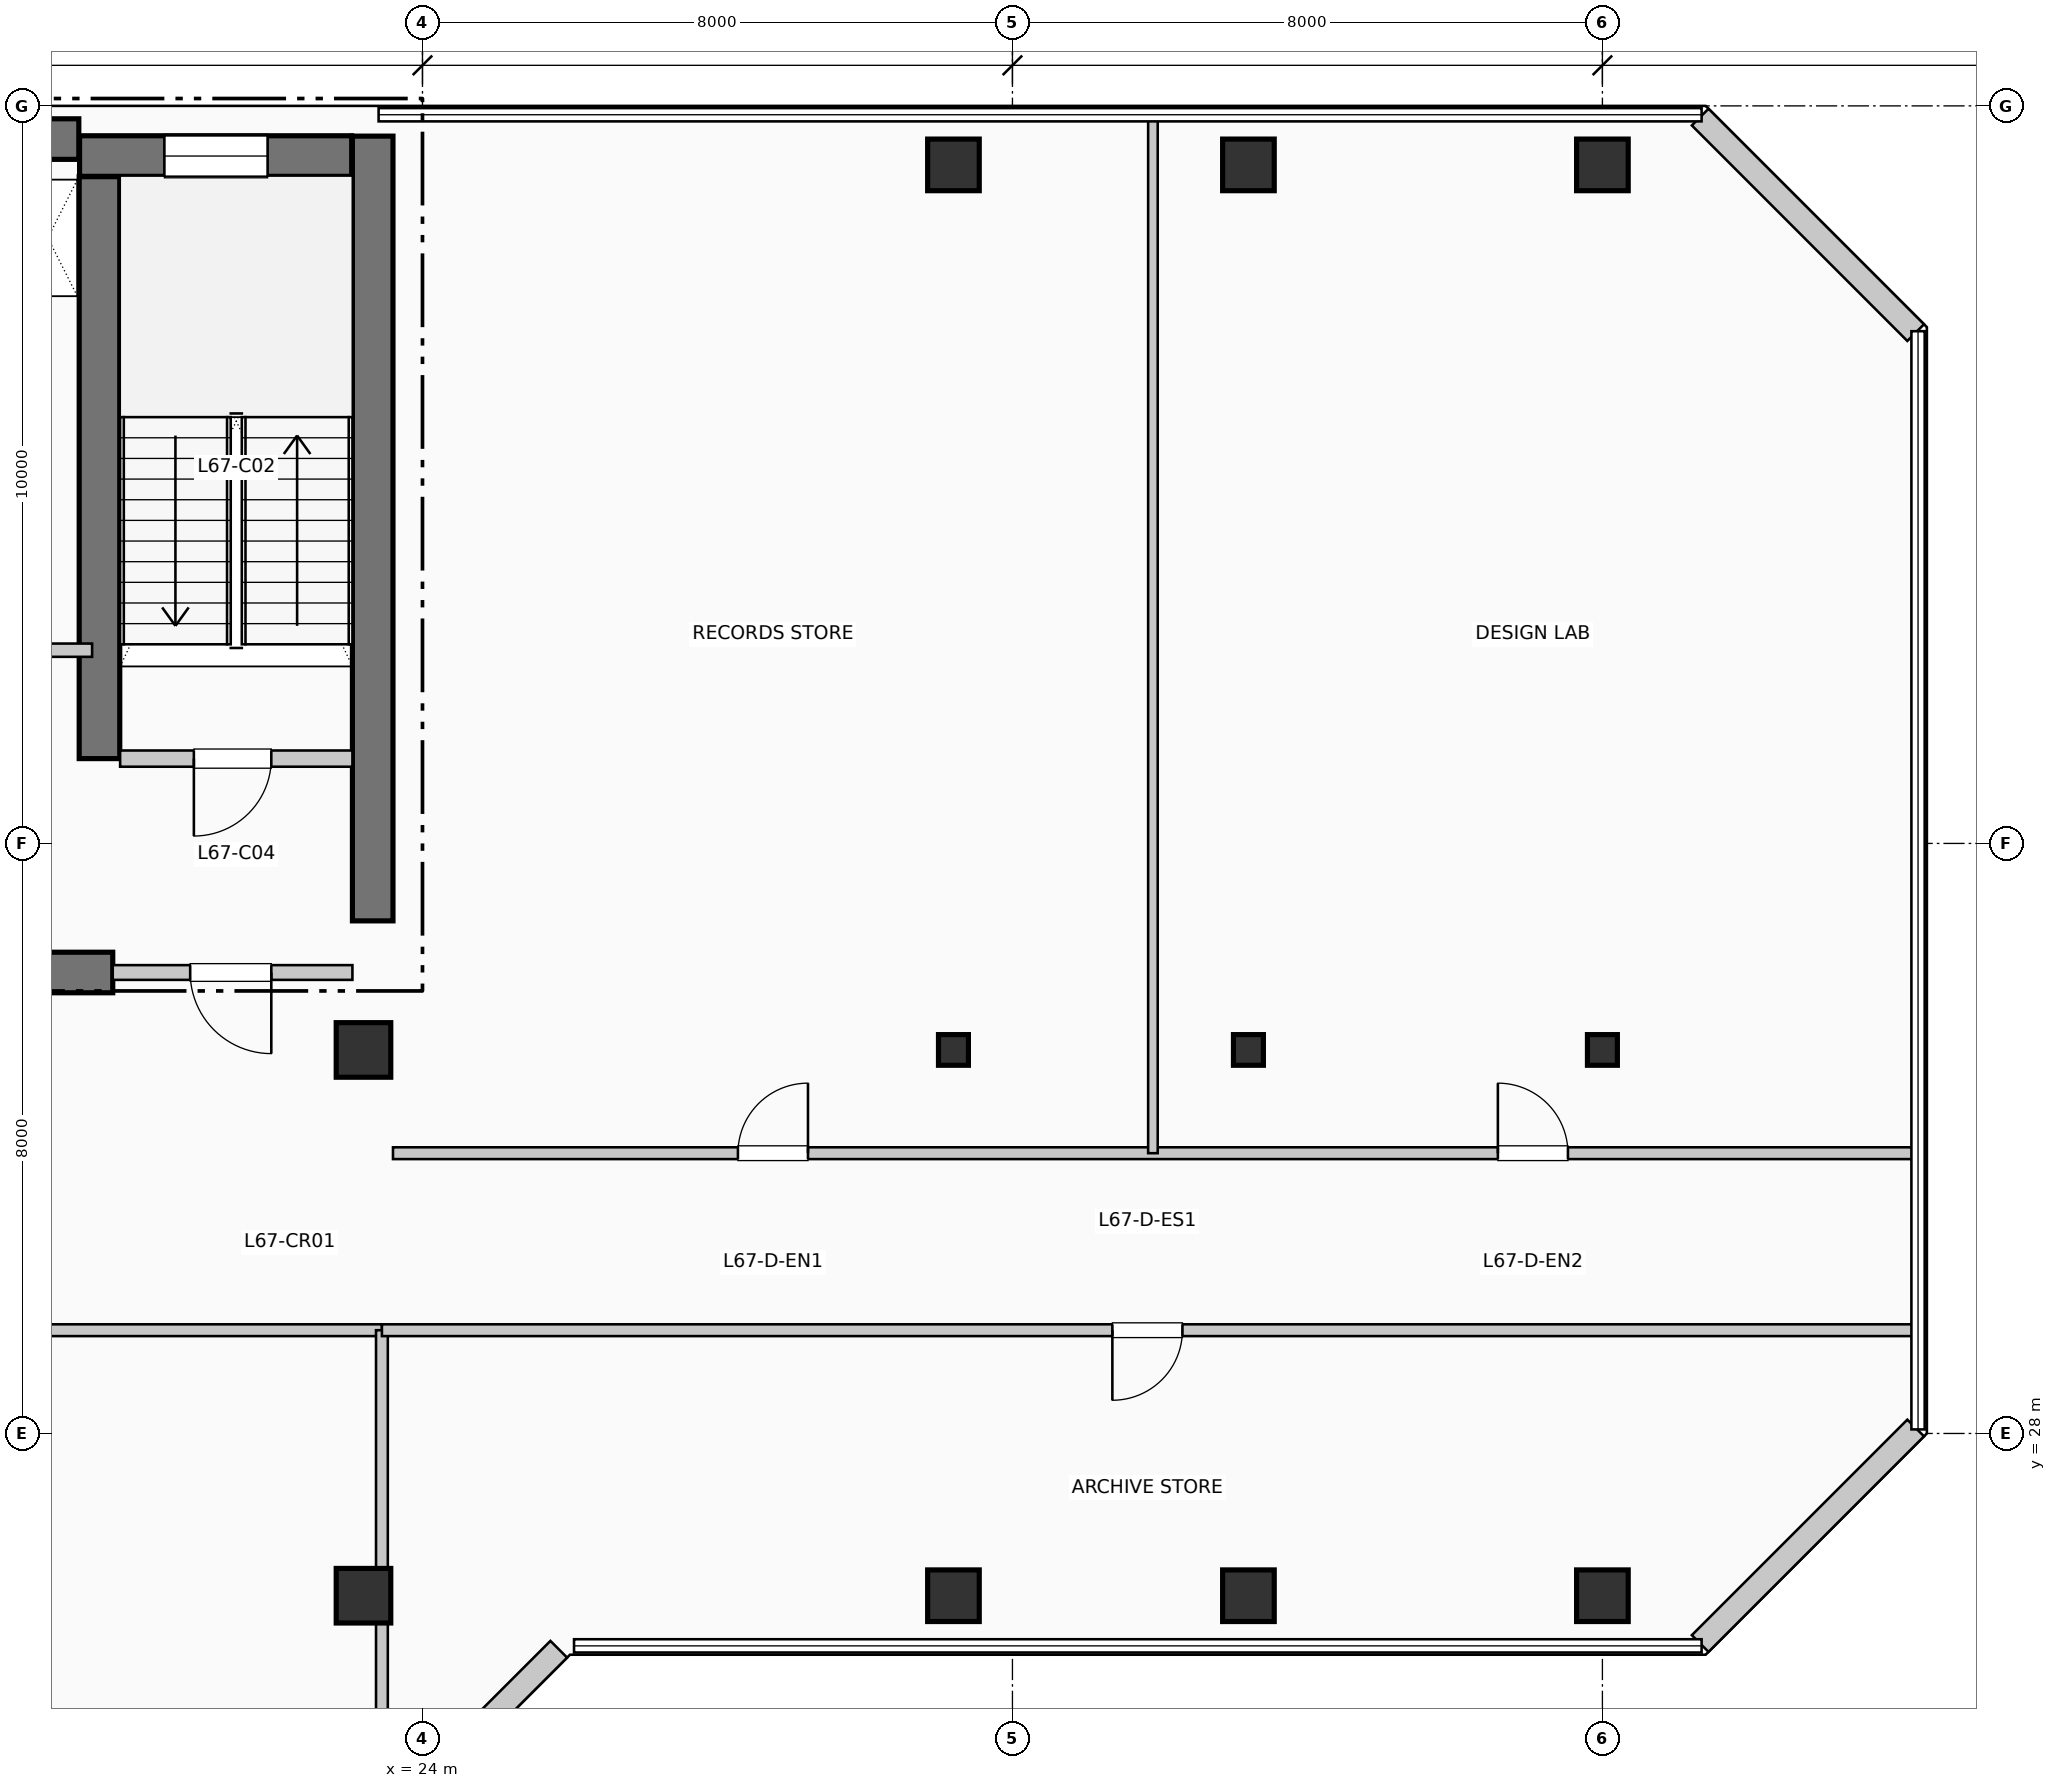
"""IFC4 building model, lengths in metres.
Left out: names, types, materials, properties, quantities, classifications, styles, units other than length and angle.
Written with IfcOpenShell. Run it as: python <this file> out.ifc"""

import sys

from ifc_helpers import new_model, si_unit, direction, frame, frame_2d, origin, origin_2d, place, context, subcontext, project, spatial, rectangle, i_section, extrude, element, fill, save


model = new_model("IFC4")
c1 = context("Model", 3, precision=1e-05, world=origin(), true_north=direction((0.0, 1.0)))
c2 = subcontext(c1, "Body", "Model", "MODEL_VIEW")
j1 = project(units=[si_unit("LENGTHUNIT", "METRE"), si_unit("PLANEANGLEUNIT", "RADIAN")], contexts=[c1])
p1 = place(None, origin())
s1 = spatial("IfcSite", under=j1, at=p1, CompositionType="ELEMENT")
p2 = place(p1, origin())
s2 = spatial("IfcBuilding", under=s1, at=p2, CompositionType="ELEMENT")
p3 = place(p2, frame((0.0, 0.0, 276.21)))
s3 = spatial("IfcBuildingStorey", under=s2, at=p3, CompositionType="ELEMENT", Elevation=276.21)
p4 = place(p3, frame((5.36, 45.55, 0.0), z_axis=(0.0, 0.0, 1.0), x_axis=(1.0, 0.0, 0.0)))
e1 = element("IfcWall", 1, at=p4, inside=s3, PredefinedType="SHEAR", context=c2, shape_type="SweptSolid", body=[
    extrude(rectangle(XDim=13.98, YDim=0.55, at=frame_2d((6.99, 0.0))), origin(), (0.0, 0.0, 1.0), 3.96),
])
p5 = place(p3, frame((23.325, 34.95, 0.0), z_axis=(0.0, 0.0, 1.0), x_axis=(0.0, 1.0, 0.0)))
e2 = element("IfcWall", 2, at=p5, inside=s3, PredefinedType="SHEAR", context=c2, shape_type="SweptSolid", body=[
    extrude(rectangle(XDim=10.64, YDim=0.55, at=frame_2d((5.32, 0.0))), origin(), (0.0, 0.0, 1.0), 3.96),
])
p6 = place(p3, frame((13.68, 34.25, 0.0), z_axis=(0.0, 0.0, 1.0), x_axis=(1.0, 0.0, 0.0)))
e3 = element("IfcWall", 3, at=p6, inside=s3, PredefinedType="SHEAR", context=c2, shape_type="SweptSolid", body=[
    extrude(rectangle(XDim=6.12, YDim=0.55, at=frame_2d((3.06, 0.0))), origin(), (0.0, 0.0, 1.0), 3.96),
])
p7 = place(p3, frame((19.62, 37.15, 0.0), z_axis=(0.0, 0.0, 1.0), x_axis=(0.0, 1.0, 0.0)))
e4 = element("IfcWall", 4, at=p7, inside=s3, PredefinedType="SHEAR", context=c2, shape_type="SweptSolid", body=[
    extrude(rectangle(XDim=7.89, YDim=0.55, at=frame_2d((3.945, 0.0))), origin(), (0.0, 0.0, 1.0), 3.96),
])
p8 = place(p3, frame((19.35, 45.32, 0.0), z_axis=(0.0, 0.0, 1.0), x_axis=(1.0, 0.0, 0.0)))
e5 = element("IfcWall", 5, at=p8, inside=s3, PredefinedType="SHEAR", context=c2, shape_type="SweptSolid", body=[
    extrude(rectangle(XDim=3.69, YDim=0.55, at=frame_2d((1.845, 0.0))), origin(), (0.0, 0.0, 1.0), 3.96),
])
p9 = place(p8, frame((1.15, 0.0, 1.05)))
e6 = element("IfcOpeningElement", 6, at=p9, cuts=e5, PredefinedType="OPENING", context=c2, shape_type="SweptSolid", body=[
    extrude(rectangle(XDim=1.4, YDim=1.8, at=frame_2d((0.7, 0.9))), frame((0.0, 0.285, 0.0), z_axis=(0.0, -1.0, 0.0), x_axis=(1.0, 0.0, 0.0)), (0.0, 0.0, 1.0), 0.57),
])
for number, where, z_axis, x_axis in (
    (7, (23.2, 25.8, 0.0), (0.0, 0.0, 1.0), (1.0, 0.0, 0.0)),
    (8, (23.2, 33.2, 0.0), (0.0, 0.0, 1.0), (1.0, 0.0, 0.0)),
):
    element("IfcColumn", number, at=place(p3, frame(where, z_axis=z_axis, x_axis=x_axis)), inside=s3, PredefinedType="COLUMN", context=c2, shape_type="SweptSolid", body=[
        extrude(rectangle(XDim=0.74, YDim=0.74, at=origin_2d()), origin(), (0.0, 0.0, 1.0), 3.96),
    ])
p10 = place(p3, frame((31.2, 25.8, 0.0), z_axis=(0.0, 0.0, 1.0), x_axis=(1.0, 0.0, 0.0)))
e9 = element("IfcColumn", 9, at=p10, inside=s3, PredefinedType="COLUMN", context=c2, shape_type="SweptSolid", body=[
    extrude(rectangle(XDim=0.7, YDim=0.7, at=origin_2d()), origin(), (0.0, 0.0, 1.0), 3.96),
])
p11 = place(p3, frame((31.2, 33.2, 0.0), z_axis=(0.0, 0.0, 1.0), x_axis=(1.0, 0.0, 0.0)))
e10 = element("IfcColumn", 10, at=p11, inside=s3, PredefinedType="COLUMN", context=c2, shape_type="SweptSolid", body=[
    extrude(i_section(OverallWidth=0.406, OverallDepth=0.416, WebThickness=0.022, FlangeThickness=0.036, at=origin_2d()), origin(), (0.0, 0.0, 1.0), 3.96),
])
for number, where, z_axis, x_axis in (
    (11, (31.2, 45.2, 0.0), (0.0, 0.0, 1.0), (1.0, 0.0, 0.0)),
    (12, (35.2, 25.8, 0.0), (0.0, 0.0, 1.0), (1.0, 0.0, 0.0)),
):
    element("IfcColumn", number, at=place(p3, frame(where, z_axis=z_axis, x_axis=x_axis)), inside=s3, PredefinedType="COLUMN", context=c2, shape_type="SweptSolid", body=[
        extrude(rectangle(XDim=0.7, YDim=0.7, at=origin_2d()), origin(), (0.0, 0.0, 1.0), 3.96),
    ])
p12 = place(p3, frame((35.2, 33.2, 0.0), z_axis=(0.0, 0.0, 1.0), x_axis=(1.0, 0.0, 0.0)))
e13 = element("IfcColumn", 13, at=p12, inside=s3, PredefinedType="COLUMN", context=c2, shape_type="SweptSolid", body=[
    extrude(i_section(OverallWidth=0.406, OverallDepth=0.416, WebThickness=0.022, FlangeThickness=0.036, at=origin_2d()), origin(), (0.0, 0.0, 1.0), 3.96),
])
for number, where, z_axis, x_axis in (
    (14, (35.2, 45.2, 0.0), (0.0, 0.0, 1.0), (1.0, 0.0, 0.0)),
    (15, (40.0, 25.8, 0.0), (0.0, 0.0, 1.0), (1.0, 0.0, 0.0)),
):
    element("IfcColumn", number, at=place(p3, frame(where, z_axis=z_axis, x_axis=x_axis)), inside=s3, PredefinedType="COLUMN", context=c2, shape_type="SweptSolid", body=[
        extrude(rectangle(XDim=0.7, YDim=0.7, at=origin_2d()), origin(), (0.0, 0.0, 1.0), 3.96),
    ])
p13 = place(p3, frame((40.0, 33.2, 0.0), z_axis=(0.0, 0.0, 1.0), x_axis=(1.0, 0.0, 0.0)))
e16 = element("IfcColumn", 16, at=p13, inside=s3, PredefinedType="COLUMN", context=c2, shape_type="SweptSolid", body=[
    extrude(i_section(OverallWidth=0.406, OverallDepth=0.416, WebThickness=0.022, FlangeThickness=0.036, at=origin_2d()), origin(), (0.0, 0.0, 1.0), 3.96),
])
p14 = place(p3, frame((40.0, 45.2, 0.0), z_axis=(0.0, 0.0, 1.0), x_axis=(1.0, 0.0, 0.0)))
e17 = element("IfcColumn", 17, at=p14, inside=s3, PredefinedType="COLUMN", context=c2, shape_type="SweptSolid", body=[
    extrude(rectangle(XDim=0.7, YDim=0.7, at=origin_2d()), origin(), (0.0, 0.0, 1.0), 3.96),
])
p15 = place(p3, frame((23.926, 23.152, 0.0), z_axis=(0.0, 0.0, 1.0), x_axis=(0.707106781187, 0.707106781187, 0.0)))
e18 = element("IfcWall", 18, at=p15, inside=s3, PredefinedType="SOLIDWALL", context=c2, shape_type="SweptSolid", body=[
    extrude(rectangle(XDim=2.718, YDim=0.32, at=frame_2d((1.359, 0.0))), origin(), (0.0, 0.0, 1.0), 3.74),
])
for number, where, z_axis, x_axis in (
    (19, (41.326, 25.152, 0.0), (0.0, 0.0, 1.0), (0.707, 0.707, 0.0)),
    (20, (44.248, 42.926, 0.0), (0.0, 0.0, 1.0), (-0.707, 0.707, 0.0)),
):
    element("IfcWall", number, at=place(p3, frame(where, z_axis=z_axis, x_axis=x_axis)), inside=s3, PredefinedType="SOLIDWALL", context=c2, shape_type="SweptSolid", body=[
        extrude(rectangle(XDim=4.133, YDim=0.32, at=frame_2d((2.066, 0.0))), origin(), (0.0, 0.0, 1.0), 3.74),
    ])
p16 = place(p3, frame((19.9, 37.15, 0.0), z_axis=(0.0, 0.0, 1.0), x_axis=(1.0, 0.0, 0.0)))
e21 = element("IfcWall", 21, at=p16, inside=s3, PredefinedType="PARTITIONING", context=c2, shape_type="SweptSolid", body=[
    extrude(rectangle(XDim=3.15, YDim=0.22, at=frame_2d((1.575, 0.0))), origin(), (0.0, 0.0, 1.0), 3.74),
])
p17 = place(p16, frame((2.05, 0.0, 0.0), z_axis=(0.0, 0.0, 1.0), x_axis=(-1.0, 0.0, 0.0)))
e22 = element("IfcOpeningElement", 22, at=p17, cuts=e21, PredefinedType="OPENING", context=c2, shape_type="SweptSolid", body=[
    extrude(rectangle(XDim=1.05, YDim=2.15, at=frame_2d((0.525, 1.075))), frame((0.0, 0.12, 0.0), z_axis=(0.0, -1.0, 0.0), x_axis=(1.0, 0.0, 0.0)), (0.0, 0.0, 1.0), 0.24),
])
p18 = place(p3, frame((19.8, 34.25, 0.0), z_axis=(0.0, 0.0, 1.0), x_axis=(1.0, 0.0, 0.0)))
e23 = element("IfcWall", 23, at=p18, inside=s3, PredefinedType="PARTITIONING", context=c2, shape_type="SweptSolid", body=[
    extrude(rectangle(XDim=3.25, YDim=0.2, at=frame_2d((1.625, 0.0))), origin(), (0.0, 0.0, 1.0), 3.74),
])
p19 = place(p18, frame((2.15, 0.0, 0.0), z_axis=(0.0, 0.0, 1.0), x_axis=(-1.0, 0.0, 0.0)))
e24 = element("IfcOpeningElement", 24, at=p19, cuts=e23, PredefinedType="OPENING", context=c2, shape_type="SweptSolid", body=[
    extrude(rectangle(XDim=1.1, YDim=2.15, at=frame_2d((0.55, 1.075))), frame((0.0, 0.11, 0.0), z_axis=(0.0, -1.0, 0.0), x_axis=(1.0, 0.0, 0.0)), (0.0, 0.0, 1.0), 0.22),
])
p20 = place(p3, frame((17.68, 38.62, 0.0), z_axis=(0.0, 0.0, 1.0), x_axis=(1.0, 0.0, 0.0)))
e25 = element("IfcWall", 25, at=p20, inside=s3, PredefinedType="PARTITIONING", context=c2, shape_type="SweptSolid", body=[
    extrude(rectangle(XDim=1.84, YDim=0.18, at=frame_2d((0.92, 0.0))), origin(), (0.0, 0.0, 1.0), 3.74),
])
p21 = place(p20, frame((0.24, 0.0, 0.0)))
e26 = element("IfcOpeningElement", 26, at=p21, cuts=e25, PredefinedType="OPENING", context=c2, shape_type="SweptSolid", body=[
    extrude(rectangle(XDim=0.92, YDim=2.1, at=frame_2d((0.46, 1.05))), frame((0.0, 0.1, 0.0), z_axis=(0.0, -1.0, 0.0), x_axis=(1.0, 0.0, 0.0)), (0.0, 0.0, 1.0), 0.2),
])
p22 = place(p3, frame((18.5, 29.4, 0.0), z_axis=(0.0, 0.0, 1.0), x_axis=(1.0, 0.0, 0.0)))
e27 = element("IfcWall", 27, at=p22, inside=s3, PredefinedType="PARTITIONING", context=c2, shape_type="SweptSolid", body=[
    extrude(rectangle(XDim=4.95, YDim=0.16, at=frame_2d((2.475, 0.0))), origin(), (0.0, 0.0, 1.0), 3.425),
])
p23 = place(p3, frame((23.45, 5.99, 0.0), z_axis=(0.0, 0.0, 1.0), x_axis=(0.0, 1.0, 0.0)))
e28 = element("IfcWall", 28, at=p23, inside=s3, PredefinedType="PARTITIONING", context=c2, shape_type="SweptSolid", body=[
    extrude(rectangle(XDim=23.41, YDim=0.16, at=frame_2d((11.705, 0.0))), origin(), (0.0, 0.0, 1.0), 3.175),
])
p24 = place(p3, frame((23.45, 29.4, 0.0), z_axis=(0.0, 0.0, 1.0), x_axis=(1.0, 0.0, 0.0)))
e29 = element("IfcWall", 29, at=p24, inside=s3, PredefinedType="PARTITIONING", context=c2, shape_type="SweptSolid", body=[
    extrude(rectangle(XDim=20.76, YDim=0.16, at=frame_2d((10.38, 0.0))), origin(), (0.0, 0.0, 1.0), 3.425),
])
p25 = place(p24, frame((10.855, 0.0, 0.0), z_axis=(0.0, 0.0, 1.0), x_axis=(-1.0, 0.0, 0.0)))
e30 = element("IfcOpeningElement", 30, at=p25, cuts=e29, PredefinedType="OPENING", context=c2, shape_type="SweptSolid", body=[
    extrude(rectangle(XDim=0.95, YDim=2.15, at=frame_2d((0.475, 1.075))), frame((0.0, 0.09, 0.0), z_axis=(0.0, -1.0, 0.0), x_axis=(1.0, 0.0, 0.0)), (0.0, 0.0, 1.0), 0.18),
])
p26 = place(p3, frame((23.6, 31.8, 0.0), z_axis=(0.0, 0.0, 1.0), x_axis=(1.0, 0.0, 0.0)))
e31 = element("IfcWall", 31, at=p26, inside=s3, PredefinedType="PARTITIONING", context=c2, shape_type="SweptSolid", body=[
    extrude(rectangle(XDim=20.61, YDim=0.16, at=frame_2d((10.305, 0.0))), origin(), (0.0, 0.0, 1.0), 3.74),
])
p27 = place(p26, frame((4.677, 0.0, 0.0)))
e32 = element("IfcOpeningElement", 32, at=p27, cuts=e31, PredefinedType="OPENING", context=c2, shape_type="SweptSolid", body=[
    extrude(rectangle(XDim=0.95, YDim=2.15, at=frame_2d((0.475, 1.075))), frame((0.0, 0.09, 0.0), z_axis=(0.0, -1.0, 0.0), x_axis=(1.0, 0.0, 0.0)), (0.0, 0.0, 1.0), 0.18),
])
p28 = place(p26, frame((14.982, 0.0, 0.0)))
e33 = element("IfcOpeningElement", 33, at=p28, cuts=e31, PredefinedType="OPENING", context=c2, shape_type="SweptSolid", body=[
    extrude(rectangle(XDim=0.95, YDim=2.15, at=frame_2d((0.475, 1.075))), frame((0.0, 0.09, 0.0), z_axis=(0.0, -1.0, 0.0), x_axis=(1.0, 0.0, 0.0)), (0.0, 0.0, 1.0), 0.18),
])
p29 = place(p3, frame((33.905, 31.8, 0.0), z_axis=(0.0, 0.0, 1.0), x_axis=(0.0, 1.0, 0.0)))
e34 = element("IfcWall", 34, at=p29, inside=s3, PredefinedType="PARTITIONING", context=c2, shape_type="SweptSolid", body=[
    extrude(rectangle(XDim=14.01, YDim=0.13, at=frame_2d((7.005, 0.0))), origin(), (0.0, 0.0, 1.0), 3.74),
])
p30 = place(p9, origin())
e35 = element("IfcWindow", 35, at=p30, inside=s3, PartitioningType="SINGLE_PANEL", PredefinedType="WINDOW", context=c2, shape_type="SweptSolid", body=[
    extrude(rectangle(XDim=1.4, YDim=1.8, at=frame_2d((0.7, 0.9))), frame((0.0, 0.03, 0.0), z_axis=(0.0, -1.0, 0.0), x_axis=(1.0, 0.0, 0.0)), (0.0, 0.0, 1.0), 0.06),
])
fill(e6, e35)
p31 = place(p17, origin())
e36 = element("IfcDoor", 36, at=p31, inside=s3, OperationType="SINGLE_SWING_LEFT", PredefinedType="DOOR", context=c2, shape_type="SweptSolid", body=[
    extrude(rectangle(XDim=1.05, YDim=2.15, at=frame_2d((0.525, 1.075))), frame((0.0, 0.025, 0.0), z_axis=(0.0, -1.0, 0.0), x_axis=(1.0, 0.0, 0.0)), (0.0, 0.0, 1.0), 0.05),
])
fill(e22, e36)
p32 = place(p19, origin())
e37 = element("IfcDoor", 37, at=p32, inside=s3, OperationType="SINGLE_SWING_RIGHT", PredefinedType="DOOR", context=c2, shape_type="SweptSolid", body=[
    extrude(rectangle(XDim=1.1, YDim=2.15, at=frame_2d((0.55, 1.075))), frame((0.0, 0.025, 0.0), z_axis=(0.0, -1.0, 0.0), x_axis=(1.0, 0.0, 0.0)), (0.0, 0.0, 1.0), 0.05),
])
fill(e24, e37)
p33 = place(p25, origin())
e38 = element("IfcDoor", 38, at=p33, inside=s3, OperationType="SINGLE_SWING_LEFT", PredefinedType="DOOR", context=c2, shape_type="SweptSolid", body=[
    extrude(rectangle(XDim=0.95, YDim=2.15, at=frame_2d((0.475, 1.075))), frame((0.0, 0.025, 0.0), z_axis=(0.0, -1.0, 0.0), x_axis=(1.0, 0.0, 0.0)), (0.0, 0.0, 1.0), 0.05),
])
fill(e30, e38)
p34 = place(p27, origin())
e39 = element("IfcDoor", 39, at=p34, inside=s3, OperationType="SINGLE_SWING_RIGHT", PredefinedType="DOOR", context=c2, shape_type="SweptSolid", body=[
    extrude(rectangle(XDim=0.95, YDim=2.15, at=frame_2d((0.475, 1.075))), frame((0.0, 0.025, 0.0), z_axis=(0.0, -1.0, 0.0), x_axis=(1.0, 0.0, 0.0)), (0.0, 0.0, 1.0), 0.05),
])
fill(e32, e39)
p35 = place(p28, origin())
e40 = element("IfcDoor", 40, at=p35, inside=s3, OperationType="SINGLE_SWING_LEFT", PredefinedType="DOOR", context=c2, shape_type="SweptSolid", body=[
    extrude(rectangle(XDim=0.95, YDim=2.15, at=frame_2d((0.475, 1.075))), frame((0.0, 0.025, 0.0), z_axis=(0.0, -1.0, 0.0), x_axis=(1.0, 0.0, 0.0)), (0.0, 0.0, 1.0), 0.05),
])
fill(e33, e40)
save(model, sys.argv[1])
